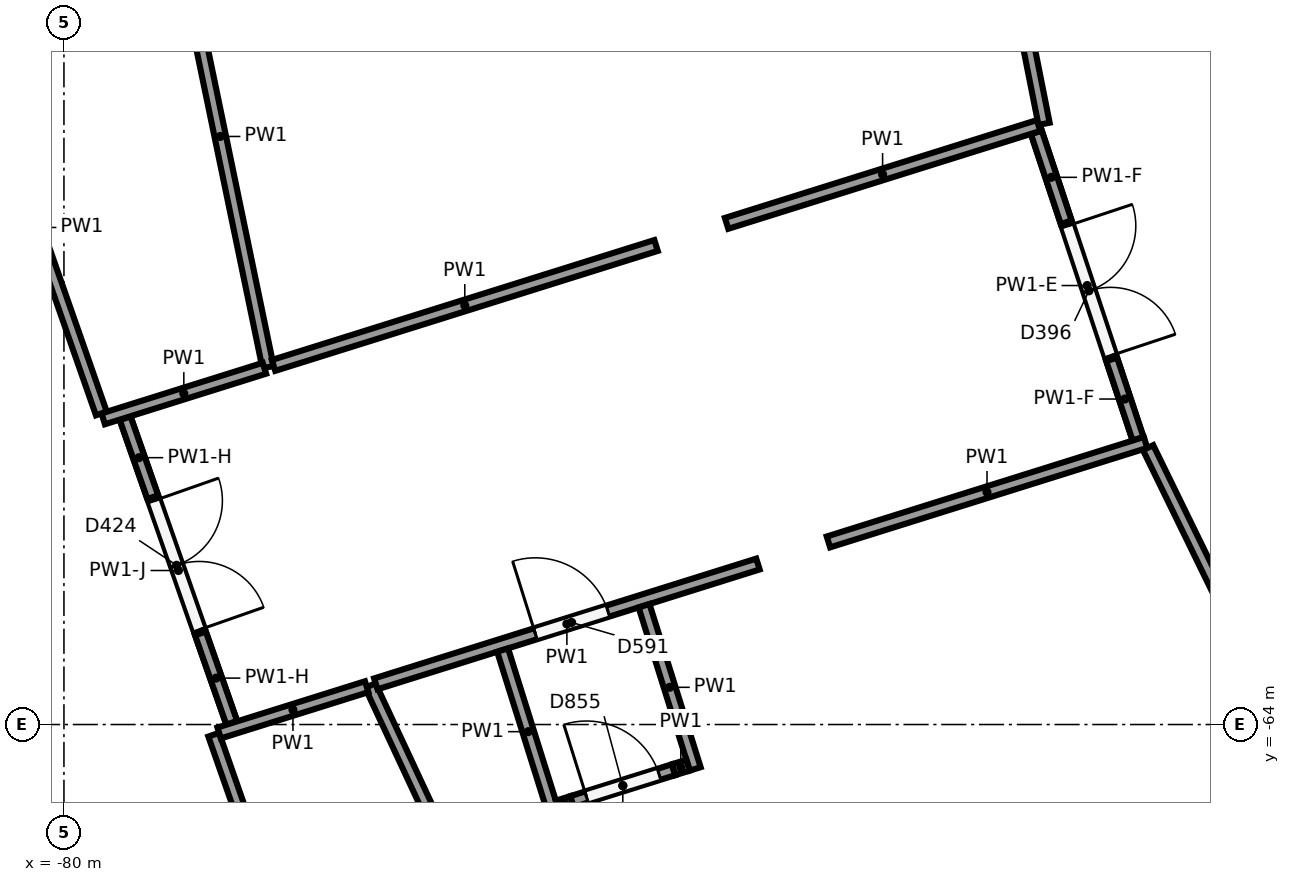
"""IFC4 building model, lengths in metres.
Left out: names, types, materials, properties, quantities, classifications, styles, units other than length and angle.
Written with IfcOpenShell. Run it as: python <this file> out.ifc"""

import sys

from ifc_helpers import new_model, si_unit, direction, frame, frame_2d, origin, origin_2d, place, context, subcontext, project, spatial, rectangle, circle, extrude, element, fill, save


model = new_model("IFC4")
c1 = context("Model", 3, precision=1e-05, world=origin(), true_north=direction((0.0, 1.0)))
c2 = subcontext(c1, "Body", "Model", "MODEL_VIEW")
j1 = project(units=[si_unit("LENGTHUNIT", "METRE"), si_unit("PLANEANGLEUNIT", "RADIAN")], contexts=[c1])
p1 = place(None, origin())
s1 = spatial("IfcSite", under=j1, at=p1, CompositionType="ELEMENT")
p2 = place(p1, origin())
s2 = spatial("IfcBuilding", under=s1, at=p2, CompositionType="ELEMENT")
p3 = place(p2, origin())
s3 = spatial("IfcBuildingStorey", under=s2, at=p3, CompositionType="ELEMENT", Elevation=0.0)
p4 = place(p3, frame((-71.17, -59.677, 0.0), z_axis=(0.0, 0.0, 1.0), x_axis=(1.0, 0.0, 0.0)))
e1 = element("IfcColumn", 1, at=p4, inside=s3, PredefinedType="COLUMN", context=c2, shape_type="SweptSolid", body=[
    extrude(circle(Radius=0.45, at=origin_2d()), origin(), (0.0, 0.0, 1.0), 6.5),
])
p5 = place(p3, frame((-77.314, -59.298, 0.0), z_axis=(0.0, 0.0, 1.0), x_axis=(-0.202912951915, 0.979196779991, 0.0)))
e2 = element("IfcWall", 2, at=p5, inside=s3, PredefinedType="PARTITIONING", context=c2, shape_type="SweptSolid", body=[
    extrude(rectangle(XDim=6.199, YDim=0.15, at=frame_2d((3.099, 0.0))), origin(), (0.0, 0.0, 1.0), 6.15),
])
p6 = place(p3, frame((-68.014, -51.518, 0.0), z_axis=(0.0, 0.0, 1.0), x_axis=(0.194848838481, -0.980833283562, 0.0)))
e3 = element("IfcWall", 3, at=p6, inside=s3, PredefinedType="PARTITIONING", context=c2, shape_type="SweptSolid", body=[
    extrude(rectangle(XDim=4.669, YDim=0.15, at=frame_2d((2.334, 0.0))), origin(), (0.0, 0.0, 1.0), 6.15),
])
p7 = place(p3, frame((-67.177, -56.12, 0.0), z_axis=(0.0, 0.0, 1.0), x_axis=(-0.954194783193, -0.299186088795, 0.0)))
e4 = element("IfcWall", 4, at=p7, inside=s3, PredefinedType="PARTITIONING", context=c2, shape_type="SweptSolid", body=[
    extrude(rectangle(XDim=4.302, YDim=0.15, at=frame_2d((2.151, 0.0))), origin(), (0.0, 0.0, 1.0), 6.15),
])
p8 = place(p3, frame((-72.21, -57.698, 0.0), z_axis=(0.0, 0.0, 1.0), x_axis=(-0.954205312056, -0.299152507001, 0.0)))
e5 = element("IfcWall", 5, at=p8, inside=s3, PredefinedType="PARTITIONING", context=c2, shape_type="SweptSolid", body=[
    extrude(rectangle(XDim=5.274, YDim=0.15, at=frame_2d((2.637, 0.0))), origin(), (0.0, 0.0, 1.0), 6.15),
])
p9 = place(p3, frame((-77.362, -59.313, 0.0), z_axis=(0.0, 0.0, 1.0), x_axis=(-0.954198139725, -0.299175383588, 0.0)))
e6 = element("IfcWall", 6, at=p9, inside=s3, PredefinedType="PARTITIONING", context=c2, shape_type="SweptSolid", body=[
    extrude(rectangle(XDim=2.223, YDim=0.15, at=frame_2d((1.111, 0.0))), origin(), (0.0, 0.0, 1.0), 6.15),
])
p10 = place(p3, frame((-79.508, -59.907, 0.0), z_axis=(0.0, 0.0, 1.0), x_axis=(-0.330291692253, 0.943878910681, 0.0)))
e7 = element("IfcWall", 7, at=p10, inside=s3, PredefinedType="PARTITIONING", context=c2, shape_type="SweptSolid", body=[
    extrude(rectangle(XDim=5.185, YDim=0.15, at=frame_2d((2.592, 0.0))), origin(), (0.0, 0.0, 1.0), 6.15),
])
p11 = place(p3, frame((-73.684, -68.387, 0.0), z_axis=(0.0, 0.0, 1.0), x_axis=(-0.42266047211, 0.906288102821, 0.0)))
e8 = element("IfcWall", 8, at=p11, inside=s3, PredefinedType="PARTITIONING", context=c2, shape_type="SweptSolid", body=[
    extrude(rectangle(XDim=5.406, YDim=0.15, at=frame_2d((2.703, 0.0))), origin(), (0.0, 0.0, 1.0), 6.15),
])
p12 = place(p3, frame((-75.896, -63.465, 0.0), z_axis=(0.0, 0.0, 1.0), x_axis=(0.954206671626, 0.29914817035, 0.0)))
e9 = element("IfcWall", 9, at=p12, inside=s3, PredefinedType="PARTITIONING", context=c2, shape_type="SweptSolid", body=[
    extrude(rectangle(XDim=5.269, YDim=0.15, at=frame_2d((2.634, 0.0))), origin(), (0.0, 0.0, 1.0), 6.15),
])
p13 = place(p12, frame((2.2, 0.0, 0.0)))
e10 = element("IfcOpeningElement", 10, at=p13, cuts=e9, PredefinedType="OPENING", context=c2, shape_type="SweptSolid", body=[
    extrude(rectangle(XDim=1.0, YDim=2.1, at=frame_2d((0.5, 1.05))), frame((0.0, 0.085, 0.0), z_axis=(0.0, -1.0, 0.0), x_axis=(1.0, 0.0, 0.0)), (0.0, 0.0, 1.0), 0.17),
])
p14 = place(p3, frame((-69.942, -61.598, 0.0), z_axis=(0.0, 0.0, 1.0), x_axis=(0.954192437986, 0.299193568262, 0.0)))
e11 = element("IfcWall", 11, at=p14, inside=s3, PredefinedType="PARTITIONING", context=c2, shape_type="SweptSolid", body=[
    extrude(rectangle(XDim=4.373, YDim=0.15, at=frame_2d((2.187, 0.0))), origin(), (0.0, 0.0, 1.0), 6.15),
])
p15 = place(p3, frame((-65.736, -60.358, 0.0), z_axis=(0.0, 0.0, 1.0), x_axis=(0.438916996059, -0.898527612581, 0.0)))
e12 = element("IfcWall", 12, at=p15, inside=s3, PredefinedType="PARTITIONING", context=c2, shape_type="SweptSolid", body=[
    extrude(rectangle(XDim=4.601, YDim=0.15, at=frame_2d((2.301, 0.0))), origin(), (0.0, 0.0, 1.0), 6.15),
])
p16 = place(p3, frame((-76.688, -67.969, 0.0), z_axis=(0.0, 0.0, 1.0), x_axis=(-0.330235334568, 0.943898630046, 0.0)))
e13 = element("IfcWall", 13, at=p16, inside=s3, PredefinedType="PARTITIONING", context=c2, shape_type="SweptSolid", body=[
    extrude(rectangle(XDim=4.063, YDim=0.15, at=frame_2d((2.032, 0.0))), origin(), (0.0, 0.0, 1.0), 6.15),
])
p17 = place(p3, frame((-77.958, -64.111, 0.0), z_axis=(0.0, 0.0, 1.0), x_axis=(0.954206277419, 0.299149427767, 0.0)))
e14 = element("IfcWall", 14, at=p17, inside=s3, PredefinedType="PARTITIONING", context=c2, shape_type="SweptSolid", body=[
    extrude(rectangle(XDim=2.035, YDim=0.15, at=frame_2d((1.017, 0.0))), origin(), (0.0, 0.0, 1.0), 6.15),
])
for number, where, z_axis, x_axis in (
    (15, (-74.228, -63.021, 0.0), (0.0, 0.0, 1.0), (0.299, -0.954, 0.0)),
    (16, (-72.367, -62.437, 0.0), (0.0, 0.0, 1.0), (0.299, -0.954, 0.0)),
):
    element("IfcWall", number, at=place(p3, frame(where, z_axis=z_axis, x_axis=x_axis)), inside=s3, PredefinedType="PARTITIONING", context=c2, shape_type="SweptSolid", body=[
        extrude(rectangle(XDim=2.25, YDim=0.15, at=frame_2d((1.125, 0.0))), origin(), (0.0, 0.0, 1.0), 6.15),
    ])
p18 = place(p3, frame((-73.506, -65.073, 0.0), z_axis=(0.0, 0.0, 1.0), x_axis=(0.953803895117, 0.300429908065, 0.0)))
e17 = element("IfcWall", 17, at=p18, inside=s3, PredefinedType="PARTITIONING", context=c2, shape_type="SweptSolid", body=[
    extrude(rectangle(XDim=0.2, YDim=0.15, at=frame_2d((0.1, 0.0))), origin(), (0.0, 0.0, 1.0), 6.15),
])
p19 = place(p3, frame((-73.315, -65.013, 0.0), z_axis=(0.0, 0.0, 1.0), x_axis=(0.954231413478, 0.299069238691, 0.0)))
e18 = element("IfcWall", 18, at=p19, inside=s3, PredefinedType="PARTITIONING", context=c2, shape_type="SweptSolid", body=[
    extrude(rectangle(XDim=1.4, YDim=0.15, at=frame_2d((0.7, 0.0))), origin(), (0.0, 0.0, 1.0), 6.15),
])
p20 = place(p19, frame((0.2, 0.0, 0.0)))
e19 = element("IfcOpeningElement", 19, at=p20, cuts=e18, PredefinedType="OPENING", context=c2, shape_type="SweptSolid", body=[
    extrude(rectangle(XDim=1.0, YDim=2.1, at=frame_2d((0.5, 1.05))), frame((0.0, 0.085, 0.0), z_axis=(0.0, -1.0, 0.0), x_axis=(1.0, 0.0, 0.0)), (0.0, 0.0, 1.0), 0.17),
])
p21 = place(p3, frame((-71.979, -64.595, 0.0), z_axis=(0.0, 0.0, 1.0), x_axis=(0.954262592634, 0.298969738101, 0.0)))
e20 = element("IfcWall", 20, at=p21, inside=s3, PredefinedType="PARTITIONING", context=c2, shape_type="SweptSolid", body=[
    extrude(rectangle(XDim=0.2, YDim=0.15, at=frame_2d((0.1, 0.0))), origin(), (0.0, 0.0, 1.0), 6.15),
])
p22 = place(p3, frame((-79.195, -59.97, 0.0), z_axis=(0.0, 0.0, 1.0), x_axis=(0.330288941726, -0.943879873169, 0.0)))
e21 = element("IfcWall", 21, at=p22, inside=s3, PredefinedType="PARTITIONING", context=c2, shape_type="SweptSolid", body=[
    extrude(rectangle(XDim=4.245, YDim=0.15, at=frame_2d((2.123, 0.0))), origin(), (0.0, 0.0, 1.0), 5.05),
])
p23 = place(p22, frame((1.15, 0.0, 0.0)))
e22 = element("IfcOpeningElement", 22, at=p23, cuts=e21, PredefinedType="OPENING", context=c2, shape_type="SweptSolid", body=[
    extrude(rectangle(XDim=1.8, YDim=2.1, at=frame_2d((0.9, 1.05))), frame((0.0, 0.085, 0.0), z_axis=(0.0, -1.0, 0.0), x_axis=(1.0, 0.0, 0.0)), (0.0, 0.0, 1.0), 0.17),
])
p24 = place(p3, frame((-79.195, -59.97, 5.05), z_axis=(0.0, 0.0, 1.0), x_axis=(0.330310872881, -0.943872198582, 0.0)))
e23 = element("IfcWall", 23, at=p24, inside=s3, PredefinedType="PARTITIONING", context=c2, shape_type="SweptSolid", body=[
    extrude(rectangle(XDim=1.1, YDim=0.15, at=frame_2d((0.55, 0.0))), origin(), (0.0, 0.0, 1.0), 1.1),
])
p25 = place(p3, frame((-78.204, -62.802, 5.05), z_axis=(0.0, 0.0, 1.0), x_axis=(0.3303678914, -0.943852242849, 0.0)))
e24 = element("IfcWall", 24, at=p25, inside=s3, PredefinedType="PARTITIONING", context=c2, shape_type="SweptSolid", body=[
    extrude(rectangle(XDim=1.245, YDim=0.15, at=frame_2d((0.623, 0.0))), origin(), (0.0, 0.0, 1.0), 1.1),
])
p26 = place(p3, frame((-67.206, -56.209, 0.0), z_axis=(0.0, 0.0, 1.0), x_axis=(0.314951117126, -0.949107893667, 0.0)))
e25 = element("IfcWall", 25, at=p26, inside=s3, PredefinedType="PARTITIONING", context=c2, shape_type="SweptSolid", body=[
    extrude(rectangle(XDim=4.246, YDim=0.15, at=frame_2d((2.123, 0.0))), origin(), (0.0, 0.0, 1.0), 5.25),
])
p27 = place(p26, frame((1.296, 0.0, 0.0)))
e26 = element("IfcOpeningElement", 26, at=p27, cuts=e25, PredefinedType="OPENING", context=c2, shape_type="SweptSolid", body=[
    extrude(rectangle(XDim=1.8, YDim=2.1, at=frame_2d((0.9, 1.05))), frame((0.0, 0.085, 0.0), z_axis=(0.0, -1.0, 0.0), x_axis=(1.0, 0.0, 0.0)), (0.0, 0.0, 1.0), 0.17),
])
p28 = place(p3, frame((-66.215, -59.196, 5.25), z_axis=(0.0, 0.0, 1.0), x_axis=(0.314962308515, -0.949104179853, 0.0)))
e27 = element("IfcWall", 27, at=p28, inside=s3, PredefinedType="PARTITIONING", context=c2, shape_type="SweptSolid", body=[
    extrude(rectangle(XDim=1.1, YDim=0.15, at=frame_2d((0.55, 0.0))), origin(), (0.0, 0.0, 1.0), 0.9),
])
p29 = place(p3, frame((-67.206, -56.209, 5.25), z_axis=(0.0, 0.0, 1.0), x_axis=(0.314934829508, -0.949113298381, 0.0)))
e28 = element("IfcWall", 28, at=p29, inside=s3, PredefinedType="PARTITIONING", context=c2, shape_type="SweptSolid", body=[
    extrude(rectangle(XDim=1.247, YDim=0.15, at=frame_2d((0.623, 0.0))), origin(), (0.0, 0.0, 1.0), 0.9),
])
p30 = place(p13, origin())
e29 = element("IfcDoor", 29, at=p30, inside=s3, OperationType="SINGLE_SWING_LEFT", PredefinedType="DOOR", context=c2, shape_type="SweptSolid", body=[
    extrude(rectangle(XDim=1.0, YDim=2.1, at=frame_2d((0.5, 1.05))), frame((0.0, 0.025, 0.0), z_axis=(0.0, -1.0, 0.0), x_axis=(1.0, 0.0, 0.0)), (0.0, 0.0, 1.0), 0.05),
])
fill(e10, e29)
p31 = place(p20, origin())
e30 = element("IfcDoor", 30, at=p31, inside=s3, OperationType="SINGLE_SWING_LEFT", PredefinedType="DOOR", context=c2, shape_type="SweptSolid", body=[
    extrude(rectangle(XDim=1.0, YDim=2.1, at=frame_2d((0.5, 1.05))), frame((0.0, 0.025, 0.0), z_axis=(0.0, -1.0, 0.0), x_axis=(1.0, 0.0, 0.0)), (0.0, 0.0, 1.0), 0.05),
])
fill(e19, e30)
p32 = place(p23, origin())
e31 = element("IfcDoor", 31, at=p32, inside=s3, OperationType="DOUBLE_DOOR_SINGLE_SWING", PredefinedType="DOOR", context=c2, shape_type="SweptSolid", body=[
    extrude(rectangle(XDim=1.8, YDim=2.1, at=frame_2d((0.9, 1.05))), frame((0.0, 0.025, 0.0), z_axis=(0.0, -1.0, 0.0), x_axis=(1.0, 0.0, 0.0)), (0.0, 0.0, 1.0), 0.05),
])
fill(e22, e31)
p33 = place(p27, origin())
e32 = element("IfcDoor", 32, at=p33, inside=s3, OperationType="DOUBLE_DOOR_SINGLE_SWING", PredefinedType="DOOR", context=c2, shape_type="SweptSolid", body=[
    extrude(rectangle(XDim=1.8, YDim=2.1, at=frame_2d((0.9, 1.05))), frame((0.0, 0.025, 0.0), z_axis=(0.0, -1.0, 0.0), x_axis=(1.0, 0.0, 0.0)), (0.0, 0.0, 1.0), 0.05),
])
fill(e26, e32)
save(model, sys.argv[1])
